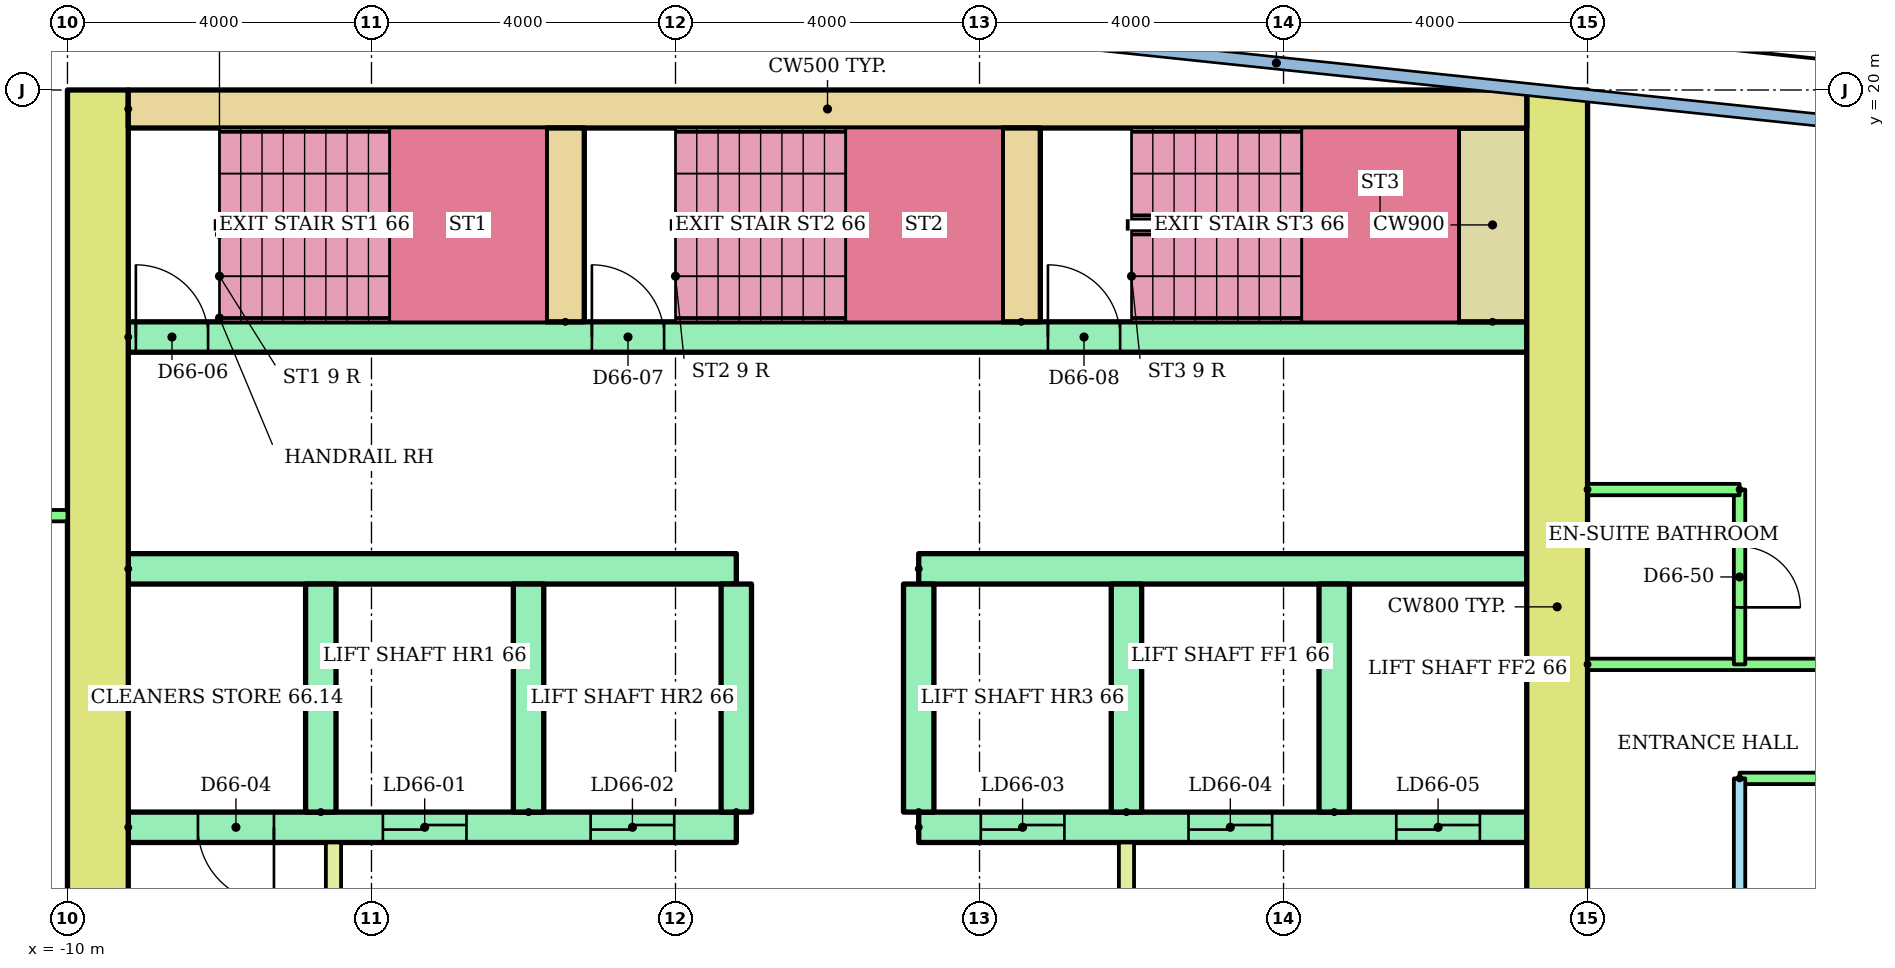
"""IFC4 building model, lengths in metres.
Left out: names, types, materials, properties, quantities, classifications, styles, units other than length and angle.
Written with IfcOpenShell. Run it as: python <this file> out.ifc"""

import sys

from ifc_helpers import new_model, si_unit, direction, frame, frame_2d, origin, place, context, subcontext, project, spatial, rectangle, extrude, element, fill, save


model = new_model("IFC4")
c1 = context("Model", 3, precision=1e-05, world=origin(), true_north=direction((0.0, 1.0)))
c2 = subcontext(c1, "Body", "Model", "MODEL_VIEW")
j1 = project(units=[si_unit("LENGTHUNIT", "METRE"), si_unit("PLANEANGLEUNIT", "RADIAN")], contexts=[c1])
p1 = place(None, origin())
s1 = spatial("IfcSite", under=j1, at=p1, CompositionType="ELEMENT")
p2 = place(p1, origin())
s2 = spatial("IfcBuilding", under=s1, at=p2, CompositionType="ELEMENT")
p3 = place(p2, frame((0.0, 0.0, 256.3)))
s3 = spatial("IfcBuildingStorey", under=s2, at=p3, CompositionType="ELEMENT", Elevation=256.3)
for number, where, z_axis, x_axis in (
    (1, (-9.6, 6.4, 0.0), (0.0, 0.0, 1.0), (0.0, 1.0, 0.0)),
    (2, (9.6, 6.4, 0.0), (0.0, 0.0, 1.0), (0.0, 1.0, 0.0)),
):
    element("IfcWall", number, at=place(p3, frame(where, z_axis=z_axis, x_axis=x_axis)), inside=s3, PredefinedType="SHEAR", context=c2, shape_type="SweptSolid", body=[
        extrude(rectangle(XDim=13.6, YDim=0.8, at=frame_2d((6.8, 0.0))), origin(), (0.0, 0.0, 1.0), 2.92),
    ])
p4 = place(p3, frame((-9.2, 19.75, 0.0)))
e3 = element("IfcWall", 3, at=p4, inside=s3, PredefinedType="SHEAR", context=c2, shape_type="SweptSolid", body=[
    extrude(rectangle(XDim=18.4, YDim=0.5, at=frame_2d((9.2, 0.0))), origin(), (0.0, 0.0, 1.0), 2.92),
])
p5 = place(p3, frame((-9.2, 10.3, 0.0)))
e4 = element("IfcWall", 4, at=p5, inside=s3, PredefinedType="SHEAR", context=c2, shape_type="SweptSolid", body=[
    extrude(rectangle(XDim=8.0, YDim=0.4, at=frame_2d((4.0, 0.0))), origin(), (0.0, 0.0, 1.0), 2.92),
])
p6 = place(p5, frame((3.35, 0.0, 0.0)))
e5 = element("IfcOpeningElement", 5, at=p6, cuts=e4, PredefinedType="OPENING", context=c2, shape_type="SweptSolid", body=[
    extrude(rectangle(XDim=1.1, YDim=2.1, at=frame_2d((0.55, 1.05))), frame((0.0, 0.21, 0.0), z_axis=(0.0, -1.0, 0.0), x_axis=(1.0, 0.0, 0.0)), (0.0, 0.0, 1.0), 0.42),
])
p7 = place(p5, frame((6.083, 0.0, 0.0)))
e6 = element("IfcOpeningElement", 6, at=p7, cuts=e4, PredefinedType="OPENING", context=c2, shape_type="SweptSolid", body=[
    extrude(rectangle(XDim=1.1, YDim=2.1, at=frame_2d((0.55, 1.05))), frame((0.0, 0.21, 0.0), z_axis=(0.0, -1.0, 0.0), x_axis=(1.0, 0.0, 0.0)), (0.0, 0.0, 1.0), 0.42),
])
p8 = place(p5, frame((0.917, 0.0, 0.0)))
e7 = element("IfcOpeningElement", 7, at=p8, cuts=e4, PredefinedType="OPENING", context=c2, shape_type="SweptSolid", body=[
    extrude(rectangle(XDim=1.0, YDim=2.1, at=frame_2d((0.5, 1.05))), frame((0.0, 0.21, 0.0), z_axis=(0.0, -1.0, 0.0), x_axis=(1.0, 0.0, 0.0)), (0.0, 0.0, 1.0), 0.42),
])
p9 = place(p3, frame((-9.2, 13.7, 0.0)))
e8 = element("IfcWall", 8, at=p9, inside=s3, PredefinedType="SHEAR", context=c2, shape_type="SweptSolid", body=[
    extrude(rectangle(XDim=8.0, YDim=0.4, at=frame_2d((4.0, 0.0))), origin(), (0.0, 0.0, 1.0), 2.92),
])
p10 = place(p3, frame((1.2, 10.3, 0.0)))
e9 = element("IfcWall", 9, at=p10, inside=s3, PredefinedType="SHEAR", context=c2, shape_type="SweptSolid", body=[
    extrude(rectangle(XDim=8.0, YDim=0.4, at=frame_2d((4.0, 0.0))), origin(), (0.0, 0.0, 1.0), 2.92),
])
p11 = place(p10, frame((0.817, 0.0, 0.0)))
e10 = element("IfcOpeningElement", 10, at=p11, cuts=e9, PredefinedType="OPENING", context=c2, shape_type="SweptSolid", body=[
    extrude(rectangle(XDim=1.1, YDim=2.1, at=frame_2d((0.55, 1.05))), frame((0.0, 0.21, 0.0), z_axis=(0.0, -1.0, 0.0), x_axis=(1.0, 0.0, 0.0)), (0.0, 0.0, 1.0), 0.42),
])
p12 = place(p10, frame((3.55, 0.0, 0.0)))
e11 = element("IfcOpeningElement", 11, at=p12, cuts=e9, PredefinedType="OPENING", context=c2, shape_type="SweptSolid", body=[
    extrude(rectangle(XDim=1.1, YDim=2.1, at=frame_2d((0.55, 1.05))), frame((0.0, 0.21, 0.0), z_axis=(0.0, -1.0, 0.0), x_axis=(1.0, 0.0, 0.0)), (0.0, 0.0, 1.0), 0.42),
])
p13 = place(p10, frame((6.283, 0.0, 0.0)))
e12 = element("IfcOpeningElement", 12, at=p13, cuts=e9, PredefinedType="OPENING", context=c2, shape_type="SweptSolid", body=[
    extrude(rectangle(XDim=1.1, YDim=2.1, at=frame_2d((0.55, 1.05))), frame((0.0, 0.21, 0.0), z_axis=(0.0, -1.0, 0.0), x_axis=(1.0, 0.0, 0.0)), (0.0, 0.0, 1.0), 0.42),
])
p14 = place(p3, frame((1.2, 13.7, 0.0)))
e13 = element("IfcWall", 13, at=p14, inside=s3, PredefinedType="SHEAR", context=c2, shape_type="SweptSolid", body=[
    extrude(rectangle(XDim=8.0, YDim=0.4, at=frame_2d((4.0, 0.0))), origin(), (0.0, 0.0, 1.0), 2.92),
])
for number, where, z_axis, x_axis in (
    (14, (-6.667, 10.5, 0.0), (0.0, 0.0, 1.0), (0.0, 1.0, 0.0)),
    (15, (-3.933, 10.5, 0.0), (0.0, 0.0, 1.0), (0.0, 1.0, 0.0)),
    (16, (-1.2, 10.5, 0.0), (0.0, 0.0, 1.0), (0.0, 1.0, 0.0)),
    (17, (1.2, 10.5, 0.0), (0.0, 0.0, 1.0), (0.0, 1.0, 0.0)),
    (18, (3.933, 10.5, 0.0), (0.0, 0.0, 1.0), (0.0, 1.0, 0.0)),
    (19, (6.667, 10.5, 0.0), (0.0, 0.0, 1.0), (0.0, 1.0, 0.0)),
):
    element("IfcWall", number, at=place(p3, frame(where, z_axis=z_axis, x_axis=x_axis)), inside=s3, PredefinedType="SHEAR", context=c2, shape_type="SweptSolid", body=[
        extrude(rectangle(XDim=3.0, YDim=0.4, at=frame_2d((1.5, 0.0))), origin(), (0.0, 0.0, 1.0), 2.92),
    ])
p15 = place(p3, frame((3.933, 6.8, 0.0), z_axis=(0.0, 0.0, 1.0), x_axis=(0.0, 1.0, 0.0)))
e20 = element("IfcWall", 20, at=p15, inside=s3, PredefinedType="PARTITIONING", context=c2, shape_type="SweptSolid", body=[
    extrude(rectangle(XDim=3.3, YDim=0.2, at=frame_2d((1.65, 0.0))), origin(), (0.0, 0.0, 1.0), 2.92),
])
p16 = place(p15, frame((1.1, 0.0, 0.0)))
e21 = element("IfcOpeningElement", 21, at=p16, cuts=e20, PredefinedType="OPENING", context=c2, shape_type="SweptSolid", body=[
    extrude(rectangle(XDim=1.1, YDim=2.1, at=frame_2d((0.55, 1.05))), frame((0.0, 0.11, 0.0), z_axis=(0.0, -1.0, 0.0), x_axis=(1.0, 0.0, 0.0)), (0.0, 0.0, 1.0), 0.22),
])
p17 = place(p3, frame((-9.2, 16.75, 0.0)))
e22 = element("IfcWall", 22, at=p17, inside=s3, PredefinedType="SHEAR", context=c2, shape_type="SweptSolid", body=[
    extrude(rectangle(XDim=18.4, YDim=0.4, at=frame_2d((9.2, 0.0))), origin(), (0.0, 0.0, 1.0), 2.92),
])
p18 = place(p17, frame((0.1, 0.0, 0.0)))
e23 = element("IfcOpeningElement", 23, at=p18, cuts=e22, PredefinedType="OPENING", context=c2, shape_type="SweptSolid", body=[
    extrude(rectangle(XDim=0.95, YDim=2.1, at=frame_2d((0.475, 1.05))), frame((0.0, 0.21, 0.0), z_axis=(0.0, -1.0, 0.0), x_axis=(1.0, 0.0, 0.0)), (0.0, 0.0, 1.0), 0.42),
])
p19 = place(p17, frame((6.1, 0.0, 0.0)))
e24 = element("IfcOpeningElement", 24, at=p19, cuts=e22, PredefinedType="OPENING", context=c2, shape_type="SweptSolid", body=[
    extrude(rectangle(XDim=0.95, YDim=2.1, at=frame_2d((0.475, 1.05))), frame((0.0, 0.21, 0.0), z_axis=(0.0, -1.0, 0.0), x_axis=(1.0, 0.0, 0.0)), (0.0, 0.0, 1.0), 0.42),
])
p20 = place(p17, frame((12.1, 0.0, 0.0)))
e25 = element("IfcOpeningElement", 25, at=p20, cuts=e22, PredefinedType="OPENING", context=c2, shape_type="SweptSolid", body=[
    extrude(rectangle(XDim=0.95, YDim=2.1, at=frame_2d((0.475, 1.05))), frame((0.0, 0.21, 0.0), z_axis=(0.0, -1.0, 0.0), x_axis=(1.0, 0.0, 0.0)), (0.0, 0.0, 1.0), 0.42),
])
for number, where, z_axis, x_axis in (
    (26, (-3.45, 16.95, 0.0), (0.0, 0.0, 1.0), (0.0, 1.0, 0.0)),
    (27, (2.55, 16.95, 0.0), (0.0, 0.0, 1.0), (0.0, 1.0, 0.0)),
):
    element("IfcWall", number, at=place(p3, frame(where, z_axis=z_axis, x_axis=x_axis)), inside=s3, PredefinedType="SHEAR", context=c2, shape_type="SweptSolid", body=[
        extrude(rectangle(XDim=2.55, YDim=0.5, at=frame_2d((1.275, 0.0))), origin(), (0.0, 0.0, 1.0), 2.92),
    ])
p21 = place(p3, frame((8.75, 16.95, 0.0), z_axis=(0.0, 0.0, 1.0), x_axis=(0.0, 1.0, 0.0)))
e28 = element("IfcWall", 28, at=p21, inside=s3, PredefinedType="SHEAR", context=c2, shape_type="SweptSolid", body=[
    extrude(rectangle(XDim=2.55, YDim=0.9, at=frame_2d((1.275, 0.0))), origin(), (0.0, 0.0, 1.0), 2.92),
])
p22 = place(p3, frame((-6.5, 6.8, 0.0), z_axis=(0.0, 0.0, 1.0), x_axis=(0.0, 1.0, 0.0)))
e29 = element("IfcWall", 29, at=p22, inside=s3, PredefinedType="PARTITIONING", context=c2, shape_type="SweptSolid", body=[
    extrude(rectangle(XDim=3.3, YDim=0.2, at=frame_2d((1.65, 0.0))), origin(), (0.0, 0.0, 1.0), 2.92),
])
p23 = place(p22, frame((1.15, 0.0, 0.0)))
e30 = element("IfcOpeningElement", 30, at=p23, cuts=e29, PredefinedType="OPENING", context=c2, shape_type="SweptSolid", body=[
    extrude(rectangle(XDim=1.0, YDim=2.1, at=frame_2d((0.5, 1.05))), frame((0.0, 0.11, 0.0), z_axis=(0.0, -1.0, 0.0), x_axis=(1.0, 0.0, 0.0)), (0.0, 0.0, 1.0), 0.22),
])
p24 = place(p3, frame((-21.89, 14.4, 0.0)))
e31 = element("IfcWall", 31, at=p24, inside=s3, PredefinedType="PARTITIONING", context=c2, shape_type="SweptSolid", body=[
    extrude(rectangle(XDim=11.89, YDim=0.15, at=frame_2d((5.945, 0.0))), origin(), (0.0, 0.0, 1.0), 2.4),
])
p25 = place(p24, frame((1.26, 0.0, 0.0)))
e32 = element("IfcOpeningElement", 32, at=p25, cuts=e31, PredefinedType="OPENING", context=c2, shape_type="SweptSolid", body=[
    extrude(rectangle(XDim=1.0, YDim=2.1, at=frame_2d((0.5, 1.05))), frame((0.0, 0.085, 0.0), z_axis=(0.0, -1.0, 0.0), x_axis=(1.0, 0.0, 0.0)), (0.0, 0.0, 1.0), 0.17),
])
p26 = place(p24, frame((8.304, 0.0, 0.0)))
e33 = element("IfcOpeningElement", 33, at=p26, cuts=e31, PredefinedType="OPENING", context=c2, shape_type="SweptSolid", body=[
    extrude(rectangle(XDim=0.9, YDim=2.1, at=frame_2d((0.45, 1.05))), frame((0.0, 0.085, 0.0), z_axis=(0.0, -1.0, 0.0), x_axis=(1.0, 0.0, 0.0)), (0.0, 0.0, 1.0), 0.17),
])
p27 = place(p3, frame((12.0, 10.943, 0.0), z_axis=(0.0, 0.0, 1.0), x_axis=(0.0, -1.0, 0.0)))
e34 = element("IfcWall", 34, at=p27, inside=s3, PredefinedType="PARTITIONING", context=c2, shape_type="SweptSolid", body=[
    extrude(rectangle(XDim=9.543, YDim=0.15, at=frame_2d((4.772, 0.0))), origin(), (0.0, 0.0, 1.0), 2.4),
])
p28 = place(p27, frame((6.469, 0.0, 0.0)))
e35 = element("IfcOpeningElement", 35, at=p28, cuts=e34, PredefinedType="OPENING", context=c2, shape_type="SweptSolid", body=[
    extrude(rectangle(XDim=0.9, YDim=2.1, at=frame_2d((0.45, 1.05))), frame((0.0, 0.085, 0.0), z_axis=(0.0, -1.0, 0.0), x_axis=(1.0, 0.0, 0.0)), (0.0, 0.0, 1.0), 0.17),
])
p29 = place(p27, frame((1.747, 0.0, 0.0)))
e36 = element("IfcOpeningElement", 36, at=p29, cuts=e34, PredefinedType="OPENING", context=c2, shape_type="SweptSolid", body=[
    extrude(rectangle(XDim=0.8, YDim=2.1, at=frame_2d((0.4, 1.05))), frame((0.0, 0.085, 0.0), z_axis=(0.0, -1.0, 0.0), x_axis=(1.0, 0.0, 0.0)), (0.0, 0.0, 1.0), 0.17),
])
p30 = place(p3, frame((32.087, 10.943, 0.0), z_axis=(0.0, 0.0, 1.0), x_axis=(-1.0, 0.0, 0.0)))
e37 = element("IfcWall", 37, at=p30, inside=s3, PredefinedType="PARTITIONING", context=c2, shape_type="SweptSolid", body=[
    extrude(rectangle(XDim=20.087, YDim=0.15, at=frame_2d((10.043, 0.0))), origin(), (0.0, 0.0, 1.0), 2.4),
])
p31 = place(p30, frame((13.487, 0.0, 0.0)))
e38 = element("IfcOpeningElement", 38, at=p31, cuts=e37, PredefinedType="OPENING", context=c2, shape_type="SweptSolid", body=[
    extrude(rectangle(XDim=0.9, YDim=2.1, at=frame_2d((0.45, 1.05))), frame((0.0, 0.085, 0.0), z_axis=(0.0, -1.0, 0.0), x_axis=(1.0, 0.0, 0.0)), (0.0, 0.0, 1.0), 0.17),
])
p32 = place(p30, frame((7.542, 0.0, 0.0)))
e39 = element("IfcOpeningElement", 39, at=p32, cuts=e37, PredefinedType="OPENING", context=c2, shape_type="SweptSolid", body=[
    extrude(rectangle(XDim=0.9, YDim=2.1, at=frame_2d((0.45, 1.05))), frame((0.0, 0.085, 0.0), z_axis=(0.0, -1.0, 0.0), x_axis=(1.0, 0.0, 0.0)), (0.0, 0.0, 1.0), 0.17),
])
p33 = place(p30, frame((1.783, 0.0, 0.0)))
e40 = element("IfcOpeningElement", 40, at=p33, cuts=e37, PredefinedType="OPENING", context=c2, shape_type="SweptSolid", body=[
    extrude(rectangle(XDim=0.9, YDim=2.1, at=frame_2d((0.45, 1.05))), frame((0.0, 0.085, 0.0), z_axis=(0.0, -1.0, 0.0), x_axis=(1.0, 0.0, 0.0)), (0.0, 0.0, 1.0), 0.17),
])
p34 = place(p3, frame((10.0, 12.443, 0.0)))
e41 = element("IfcWall", 41, at=p34, inside=s3, PredefinedType="PARTITIONING", context=c2, shape_type="SweptSolid", body=[
    extrude(rectangle(XDim=22.244, YDim=0.15, at=frame_2d((11.122, 0.0))), origin(), (0.0, 0.0, 1.0), 2.4),
])
p35 = place(p34, frame((3.47, 0.0, 0.0)))
e42 = element("IfcOpeningElement", 42, at=p35, cuts=e41, PredefinedType="OPENING", context=c2, shape_type="SweptSolid", body=[
    extrude(rectangle(XDim=0.9, YDim=2.1, at=frame_2d((0.45, 1.05))), frame((0.0, 0.085, 0.0), z_axis=(0.0, -1.0, 0.0), x_axis=(1.0, 0.0, 0.0)), (0.0, 0.0, 1.0), 0.17),
])
p36 = place(p34, frame((11.318, 0.0, 0.0)))
e43 = element("IfcOpeningElement", 43, at=p36, cuts=e41, PredefinedType="OPENING", context=c2, shape_type="SweptSolid", body=[
    extrude(rectangle(XDim=1.0, YDim=2.1, at=frame_2d((0.5, 1.05))), frame((0.0, 0.085, 0.0), z_axis=(0.0, -1.0, 0.0), x_axis=(1.0, 0.0, 0.0)), (0.0, 0.0, 1.0), 0.17),
])
p37 = place(p34, frame((18.477, 0.0, 0.0)))
e44 = element("IfcOpeningElement", 44, at=p37, cuts=e41, PredefinedType="OPENING", context=c2, shape_type="SweptSolid", body=[
    extrude(rectangle(XDim=0.9, YDim=2.1, at=frame_2d((0.45, 1.05))), frame((0.0, 0.085, 0.0), z_axis=(0.0, -1.0, 0.0), x_axis=(1.0, 0.0, 0.0)), (0.0, 0.0, 1.0), 0.17),
])
p38 = place(p3, frame((12.0, 14.743, 0.0), z_axis=(0.0, 0.0, 1.0), x_axis=(0.0, -1.0, 0.0)))
e45 = element("IfcWall", 45, at=p38, inside=s3, PredefinedType="PARTITIONING", context=c2, shape_type="SweptSolid", body=[
    extrude(rectangle(XDim=2.3, YDim=0.15, at=frame_2d((1.15, 0.0))), origin(), (0.0, 0.0, 1.0), 2.4),
])
p39 = place(p38, frame((0.75, 0.0, 0.0)))
e46 = element("IfcOpeningElement", 46, at=p39, cuts=e45, PredefinedType="OPENING", context=c2, shape_type="SweptSolid", body=[
    extrude(rectangle(XDim=0.8, YDim=2.1, at=frame_2d((0.4, 1.05))), frame((0.0, 0.085, 0.0), z_axis=(0.0, -1.0, 0.0), x_axis=(1.0, 0.0, 0.0)), (0.0, 0.0, 1.0), 0.17),
])
p40 = place(p3, frame((10.0, 14.743, 0.0)))
e47 = element("IfcWall", 47, at=p40, inside=s3, PredefinedType="PARTITIONING", context=c2, shape_type="SweptSolid", body=[
    extrude(rectangle(XDim=2.0, YDim=0.15, at=frame_2d((1.0, 0.0))), origin(), (0.0, 0.0, 1.0), 2.4),
])
p41 = place(p6, origin())
e48 = element("IfcDoor", 48, at=p41, inside=s3, OperationType="SLIDING_TO_LEFT", PredefinedType="DOOR", context=c2, shape_type="SweptSolid", body=[
    extrude(rectangle(XDim=1.1, YDim=2.1, at=frame_2d((0.55, 1.05))), frame((0.0, 0.025, 0.0), z_axis=(0.0, -1.0, 0.0), x_axis=(1.0, 0.0, 0.0)), (0.0, 0.0, 1.0), 0.05),
])
fill(e5, e48)
p42 = place(p7, origin())
e49 = element("IfcDoor", 49, at=p42, inside=s3, OperationType="SLIDING_TO_LEFT", PredefinedType="DOOR", context=c2, shape_type="SweptSolid", body=[
    extrude(rectangle(XDim=1.1, YDim=2.1, at=frame_2d((0.55, 1.05))), frame((0.0, 0.025, 0.0), z_axis=(0.0, -1.0, 0.0), x_axis=(1.0, 0.0, 0.0)), (0.0, 0.0, 1.0), 0.05),
])
fill(e6, e49)
p43 = place(p11, origin())
e50 = element("IfcDoor", 50, at=p43, inside=s3, OperationType="SLIDING_TO_LEFT", PredefinedType="DOOR", context=c2, shape_type="SweptSolid", body=[
    extrude(rectangle(XDim=1.1, YDim=2.1, at=frame_2d((0.55, 1.05))), frame((0.0, 0.025, 0.0), z_axis=(0.0, -1.0, 0.0), x_axis=(1.0, 0.0, 0.0)), (0.0, 0.0, 1.0), 0.05),
])
fill(e10, e50)
p44 = place(p12, origin())
e51 = element("IfcDoor", 51, at=p44, inside=s3, OperationType="SLIDING_TO_LEFT", PredefinedType="DOOR", context=c2, shape_type="SweptSolid", body=[
    extrude(rectangle(XDim=1.1, YDim=2.1, at=frame_2d((0.55, 1.05))), frame((0.0, 0.025, 0.0), z_axis=(0.0, -1.0, 0.0), x_axis=(1.0, 0.0, 0.0)), (0.0, 0.0, 1.0), 0.05),
])
fill(e11, e51)
p45 = place(p13, origin())
e52 = element("IfcDoor", 52, at=p45, inside=s3, OperationType="SLIDING_TO_LEFT", PredefinedType="DOOR", context=c2, shape_type="SweptSolid", body=[
    extrude(rectangle(XDim=1.1, YDim=2.1, at=frame_2d((0.55, 1.05))), frame((0.0, 0.025, 0.0), z_axis=(0.0, -1.0, 0.0), x_axis=(1.0, 0.0, 0.0)), (0.0, 0.0, 1.0), 0.05),
])
fill(e12, e52)
p46 = place(p8, frame((1.0, 0.0, 0.0), z_axis=(0.0, 0.0, 1.0), x_axis=(-1.0, 0.0, 0.0)))
e53 = element("IfcDoor", 53, at=p46, inside=s3, OperationType="SINGLE_SWING_RIGHT", PredefinedType="DOOR", context=c2, shape_type="SweptSolid", body=[
    extrude(rectangle(XDim=1.0, YDim=2.1, at=frame_2d((0.5, 1.05))), frame((0.0, 0.025, 0.0), z_axis=(0.0, -1.0, 0.0), x_axis=(1.0, 0.0, 0.0)), (0.0, 0.0, 1.0), 0.05),
])
fill(e7, e53)
p47 = place(p18, origin())
e54 = element("IfcDoor", 54, at=p47, inside=s3, OperationType="SINGLE_SWING_LEFT", PredefinedType="DOOR", context=c2, shape_type="SweptSolid", body=[
    extrude(rectangle(XDim=0.95, YDim=2.1, at=frame_2d((0.475, 1.05))), frame((0.0, 0.025, 0.0), z_axis=(0.0, -1.0, 0.0), x_axis=(1.0, 0.0, 0.0)), (0.0, 0.0, 1.0), 0.05),
])
fill(e23, e54)
p48 = place(p19, origin())
e55 = element("IfcDoor", 55, at=p48, inside=s3, OperationType="SINGLE_SWING_LEFT", PredefinedType="DOOR", context=c2, shape_type="SweptSolid", body=[
    extrude(rectangle(XDim=0.95, YDim=2.1, at=frame_2d((0.475, 1.05))), frame((0.0, 0.025, 0.0), z_axis=(0.0, -1.0, 0.0), x_axis=(1.0, 0.0, 0.0)), (0.0, 0.0, 1.0), 0.05),
])
fill(e24, e55)
p49 = place(p20, origin())
e56 = element("IfcDoor", 56, at=p49, inside=s3, OperationType="SINGLE_SWING_LEFT", PredefinedType="DOOR", context=c2, shape_type="SweptSolid", body=[
    extrude(rectangle(XDim=0.95, YDim=2.1, at=frame_2d((0.475, 1.05))), frame((0.0, 0.025, 0.0), z_axis=(0.0, -1.0, 0.0), x_axis=(1.0, 0.0, 0.0)), (0.0, 0.0, 1.0), 0.05),
])
fill(e25, e56)
p50 = place(p39, origin())
e57 = element("IfcDoor", 57, at=p50, inside=s3, OperationType="SINGLE_SWING_RIGHT", PredefinedType="DOOR", context=c2, shape_type="SweptSolid", body=[
    extrude(rectangle(XDim=0.8, YDim=2.1, at=frame_2d((0.4, 1.05))), frame((0.0, 0.025, 0.0), z_axis=(0.0, -1.0, 0.0), x_axis=(1.0, 0.0, 0.0)), (0.0, 0.0, 1.0), 0.05),
])
fill(e46, e57)
save(model, sys.argv[1])
